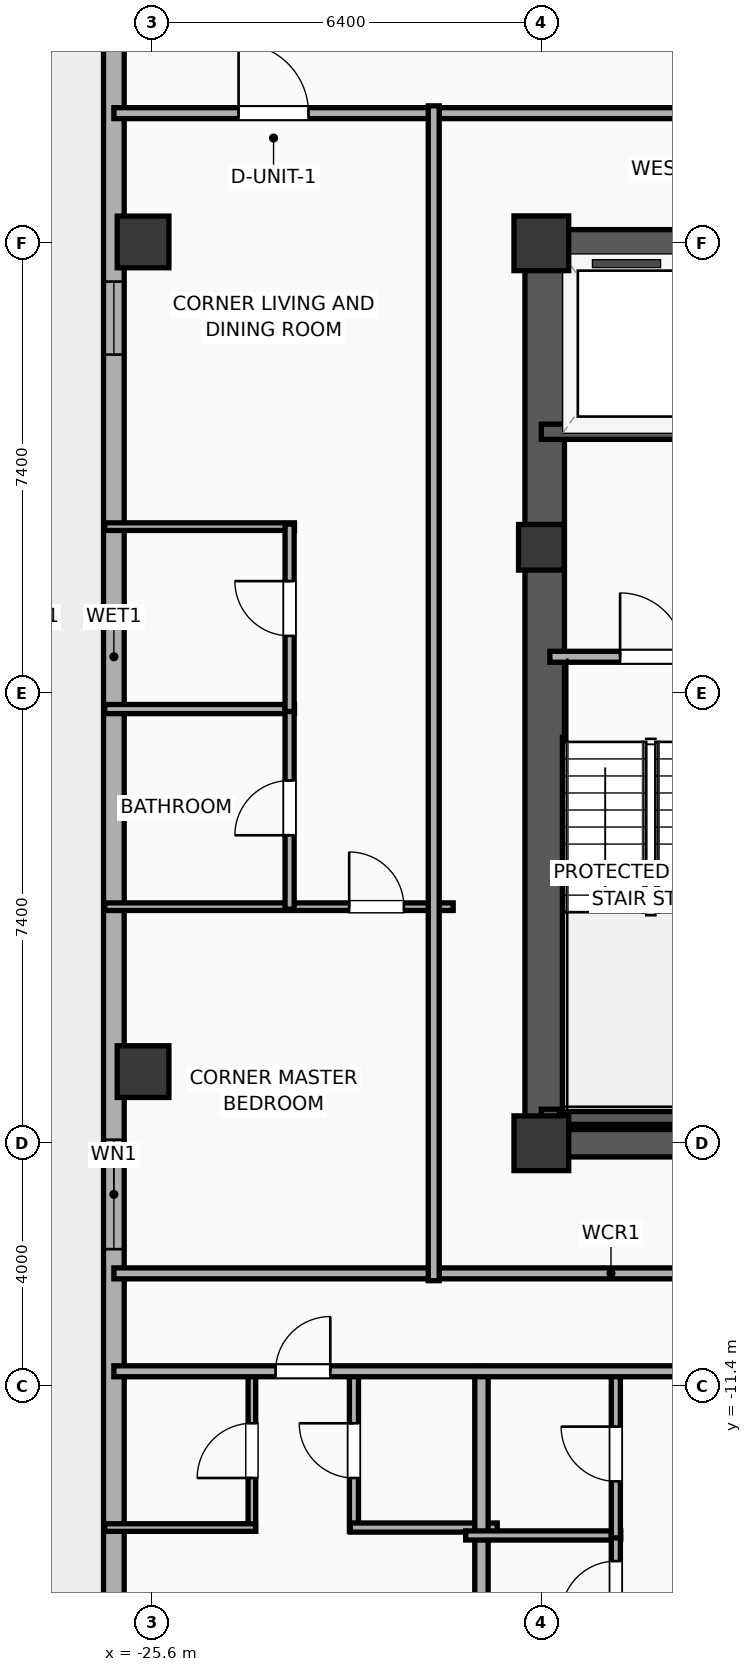
"""IFC4 building model, lengths in metres.
Left out: names, types, materials, properties, quantities, classifications, styles, units other than length and angle.
Written with IfcOpenShell. Run it as: python <this file> out.ifc"""

import sys

from ifc_helpers import new_model, si_unit, direction, frame, frame_2d, origin, origin_2d, place, context, subcontext, project, spatial, rectangle, hollow_rectangle, extrude, element, fill, save


model = new_model("IFC4")
c1 = context("Model", 3, precision=1e-05, world=origin(), true_north=direction((0.0, 1.0)))
c2 = subcontext(c1, "Body", "Model", "MODEL_VIEW")
j1 = project(units=[si_unit("LENGTHUNIT", "METRE"), si_unit("PLANEANGLEUNIT", "RADIAN")], contexts=[c1])
p1 = place(None, origin())
s1 = spatial("IfcSite", under=j1, at=p1, CompositionType="ELEMENT")
p2 = place(p1, origin())
s2 = spatial("IfcBuilding", under=s1, at=p2, CompositionType="ELEMENT")
p3 = place(p2, frame((0.0, 0.0, 231.4)))
s3 = spatial("IfcBuildingStorey", under=s2, at=p3, CompositionType="ELEMENT", Elevation=231.4)
p4 = place(p3, frame((-19.2, -7.4, 0.0), z_axis=(0.0, 0.0, 1.0), x_axis=(1.0, 0.0, 0.0)))
e1 = element("IfcColumn", 1, at=p4, inside=s3, PredefinedType="COLUMN", context=c2, shape_type="SweptSolid", body=[
    extrude(rectangle(XDim=0.9, YDim=0.9, at=origin_2d()), origin(), (0.0, 0.0, 1.0), 3.9),
])
p5 = place(p3, frame((-19.2, 2.4, 0.0), z_axis=(0.0, 0.0, 1.0), x_axis=(1.0, 0.0, 0.0)))
e2 = element("IfcColumn", 2, at=p5, inside=s3, PredefinedType="COLUMN", context=c2, shape_type="SweptSolid", body=[
    extrude(rectangle(XDim=0.75, YDim=0.75, at=origin_2d()), origin(), (0.0, 0.0, 1.0), 3.9),
])
p6 = place(p3, frame((-19.2, 7.4, 0.0), z_axis=(0.0, 0.0, 1.0), x_axis=(1.0, 0.0, 0.0)))
e3 = element("IfcColumn", 3, at=p6, inside=s3, PredefinedType="COLUMN", context=c2, shape_type="SweptSolid", body=[
    extrude(rectangle(XDim=0.9, YDim=0.9, at=origin_2d()), origin(), (0.0, 0.0, 1.0), 3.9),
])
for number, where, z_axis, x_axis in (
    (4, (-19.425, -7.4, 0.0), (0.0, 0.0, 1.0), (1.0, 0.0, 0.0)),
    (5, (-19.425, 7.4, 0.0), (0.0, 0.0, 1.0), (1.0, 0.0, 0.0)),
):
    element("IfcWall", number, at=place(p3, frame(where, z_axis=z_axis, x_axis=x_axis)), inside=s3, PredefinedType="SHEAR", context=c2, shape_type="SweptSolid", body=[
        extrude(rectangle(XDim=7.25, YDim=0.45, at=frame_2d((3.625, 0.0))), origin(), (0.0, 0.0, 1.0), 3.65),
    ])
p7 = place(p3, frame((-19.145, -7.4, 0.0), z_axis=(0.0, 0.0, 1.0), x_axis=(0.0, 1.0, 0.0)))
e6 = element("IfcWall", 6, at=p7, inside=s3, PredefinedType="SHEAR", context=c2, shape_type="SweptSolid", body=[
    extrude(rectangle(XDim=14.8, YDim=0.65, at=frame_2d((7.4, 0.0))), origin(), (0.0, 0.0, 1.0), 3.65),
])
p8 = place(p3, frame((-19.2, -6.965, 0.0), z_axis=(0.0, 0.0, 1.0), x_axis=(1.0, 0.0, 0.0)))
e7 = element("IfcWall", 7, at=p8, inside=s3, PredefinedType="SOLIDWALL", context=c2, shape_type="SweptSolid", body=[
    extrude(rectangle(XDim=3.46, YDim=0.25, at=frame_2d((1.73, 0.0))), origin(), (0.0, 0.0, 1.0), 3.65),
])
for number, where, z_axis, x_axis in (
    (8, (-25.75, 7.422, 0.0), (0.0, 0.0, 1.0), (1.0, 0.0, 0.0)),
    (9, (-25.75, -6.222, 0.0), (0.0, 0.0, 1.0), (1.0, 0.0, 0.0)),
):
    element("IfcColumn", number, at=place(p3, frame(where, z_axis=z_axis, x_axis=x_axis)), inside=s3, PredefinedType="COLUMN", context=c2, shape_type="SweptSolid", body=[
        extrude(hollow_rectangle(XDim=0.85, YDim=0.85, WallThickness=0.028, at=origin_2d()), origin(), (0.0, 0.0, 1.0), 3.9),
    ])
p9 = place(p3, frame((-26.23, -15.383, 0.0), z_axis=(0.0, 0.0, 1.0), x_axis=(0.0, 1.0, 0.0)))
e10 = element("IfcWall", 10, at=p9, inside=s3, PredefinedType="ELEMENTEDWALL", context=c2, shape_type="SweptSolid", body=[
    extrude(rectangle(XDim=31.967, YDim=0.34, at=frame_2d((15.983, 0.0))), origin(), (0.0, 0.0, 1.0), 3.65),
])
p10 = place(p9, frame((6.242, 0.0, 0.75)))
e11 = element("IfcOpeningElement", 11, at=p10, cuts=e10, PredefinedType="OPENING", context=c2, shape_type="SweptSolid", body=[
    extrude(rectangle(XDim=1.8, YDim=2.1, at=frame_2d((0.9, 1.05))), frame((0.0, 0.18, 0.0), z_axis=(0.0, -1.0, 0.0), x_axis=(1.0, 0.0, 0.0)), (0.0, 0.0, 1.0), 0.36),
])
p11 = place(p9, frame((29.667, 0.0, 0.75)))
e12 = element("IfcOpeningElement", 12, at=p11, cuts=e10, PredefinedType="OPENING", context=c2, shape_type="SweptSolid", body=[
    extrude(rectangle(XDim=1.2, YDim=2.05, at=frame_2d((0.6, 1.025))), frame((0.0, 0.18, 0.0), z_axis=(0.0, -1.0, 0.0), x_axis=(1.0, 0.0, 0.0)), (0.0, 0.0, 1.0), 0.36),
])
p12 = place(p9, frame((20.953, 0.0, 0.75)))
e13 = element("IfcOpeningElement", 13, at=p12, cuts=e10, PredefinedType="OPENING", context=c2, shape_type="SweptSolid", body=[
    extrude(rectangle(XDim=1.2, YDim=2.05, at=frame_2d((0.6, 1.025))), frame((0.0, 0.18, 0.0), z_axis=(0.0, -1.0, 0.0), x_axis=(1.0, 0.0, 0.0)), (0.0, 0.0, 1.0), 0.36),
])
p13 = place(p3, frame((-19.2, 4.3, 0.0), z_axis=(0.0, 0.0, 1.0), x_axis=(1.0, 0.0, 0.0)))
e14 = element("IfcWall", 14, at=p13, inside=s3, PredefinedType="SOLIDWALL", context=c2, shape_type="SweptSolid", body=[
    extrude(rectangle(XDim=2.6, YDim=0.25, at=frame_2d((1.3, 0.0))), origin(), (0.0, 0.0, 1.0), 3.65),
])
p14 = place(p3, frame((-19.06, 0.6, 0.0), z_axis=(0.0, 0.0, 1.0), x_axis=(1.0, 0.0, 0.0)))
e15 = element("IfcWall", 15, at=p14, inside=s3, PredefinedType="PARTITIONING", context=c2, shape_type="SweptSolid", body=[
    extrude(rectangle(XDim=3.36, YDim=0.18, at=frame_2d((1.68, 0.0))), origin(), (0.0, 0.0, 1.0), 3.65),
])
p15 = place(p14, frame((1.155, 0.0, 0.0)))
e16 = element("IfcOpeningElement", 16, at=p15, cuts=e15, PredefinedType="OPENING", context=c2, shape_type="SweptSolid", body=[
    extrude(rectangle(XDim=1.05, YDim=2.05, at=frame_2d((0.525, 1.025))), frame((0.0, 0.1, 0.0), z_axis=(0.0, -1.0, 0.0), x_axis=(1.0, 0.0, 0.0)), (0.0, 0.0, 1.0), 0.2),
])
p16 = place(p3, frame((-26.23, 9.54, 0.0), z_axis=(0.0, 0.0, 1.0), x_axis=(1.0, 0.0, 0.0)))
e17 = element("IfcWall", 17, at=p16, inside=s3, PredefinedType="PARTITIONING", context=c2, shape_type="SweptSolid", body=[
    extrude(rectangle(XDim=16.35, YDim=0.18, at=frame_2d((8.175, 0.0))), origin(), (0.0, 0.0, 1.0), 3.65),
])
p17 = place(p16, frame((2.051, 0.0, 0.0)))
e18 = element("IfcOpeningElement", 18, at=p17, cuts=e17, PredefinedType="OPENING", context=c2, shape_type="SweptSolid", body=[
    extrude(rectangle(XDim=1.15, YDim=2.05, at=frame_2d((0.575, 1.025))), frame((0.0, 0.1, 0.0), z_axis=(0.0, -1.0, 0.0), x_axis=(1.0, 0.0, 0.0)), (0.0, 0.0, 1.0), 0.2),
])
p18 = place(p3, frame((-26.23, -9.54, 0.0), z_axis=(0.0, 0.0, 1.0), x_axis=(1.0, 0.0, 0.0)))
e19 = element("IfcWall", 19, at=p18, inside=s3, PredefinedType="PARTITIONING", context=c2, shape_type="SweptSolid", body=[
    extrude(rectangle(XDim=16.35, YDim=0.18, at=frame_2d((8.175, 0.0))), origin(), (0.0, 0.0, 1.0), 3.65),
])
p19 = place(p3, frame((-23.96, -13.78, 0.0), z_axis=(0.0, 0.0, 1.0), x_axis=(0.0, 1.0, 0.0)))
e20 = element("IfcWall", 20, at=p19, inside=s3, PredefinedType="PARTITIONING", context=c2, shape_type="SweptSolid", body=[
    extrude(rectangle(XDim=2.65, YDim=0.125, at=frame_2d((1.325, 0.0))), origin(), (0.0, 0.0, 1.0), 3.65),
])
p20 = place(p19, frame((0.875, 0.0, 0.0)))
e21 = element("IfcOpeningElement", 21, at=p20, cuts=e20, PredefinedType="OPENING", context=c2, shape_type="SweptSolid", body=[
    extrude(rectangle(XDim=0.9, YDim=2.05, at=frame_2d((0.45, 1.025))), frame((0.0, 0.073, 0.0), z_axis=(0.0, -1.0, 0.0), x_axis=(1.0, 0.0, 0.0)), (0.0, 0.0, 1.0), 0.145),
])
p21 = place(p3, frame((-22.282, -13.78, 0.0), z_axis=(0.0, 0.0, 1.0), x_axis=(0.0, 1.0, 0.0)))
e22 = element("IfcWall", 22, at=p21, inside=s3, PredefinedType="PLUMBINGWALL", context=c2, shape_type="SweptSolid", body=[
    extrude(rectangle(XDim=2.65, YDim=0.15, at=frame_2d((1.325, 0.0))), origin(), (0.0, 0.0, 1.0), 3.65),
])
p22 = place(p21, frame((0.875, 0.0, 0.0)))
e23 = element("IfcOpeningElement", 23, at=p22, cuts=e22, PredefinedType="OPENING", context=c2, shape_type="SweptSolid", body=[
    extrude(rectangle(XDim=0.9, YDim=2.05, at=frame_2d((0.45, 1.025))), frame((0.0, 0.085, 0.0), z_axis=(0.0, -1.0, 0.0), x_axis=(1.0, 0.0, 0.0)), (0.0, 0.0, 1.0), 0.17),
])
p23 = place(p3, frame((-26.38, -13.72, 0.0), z_axis=(0.0, 0.0, 1.0), x_axis=(1.0, 0.0, 0.0)))
e24 = element("IfcWall", 24, at=p23, inside=s3, PredefinedType="PARTITIONING", context=c2, shape_type="SweptSolid", body=[
    extrude(rectangle(XDim=2.48, YDim=0.125, at=frame_2d((1.24, 0.0))), origin(), (0.0, 0.0, 1.0), 3.65),
])
p24 = place(p3, frame((-22.342, -13.72, 0.0), z_axis=(0.0, 0.0, 1.0), x_axis=(1.0, 0.0, 0.0)))
e25 = element("IfcWall", 25, at=p24, inside=s3, PredefinedType="PLUMBINGWALL", context=c2, shape_type="SweptSolid", body=[
    extrude(rectangle(XDim=2.417, YDim=0.15, at=frame_2d((1.208, 0.0))), origin(), (0.0, 0.0, 1.0), 3.65),
])
p25 = place(p3, frame((-20.185, -18.83, 0.0), z_axis=(0.0, 0.0, 1.0), x_axis=(0.0, 1.0, 0.0)))
e26 = element("IfcWall", 26, at=p25, inside=s3, PredefinedType="PARTITIONING", context=c2, shape_type="SweptSolid", body=[
    extrude(rectangle(XDim=7.76, YDim=0.22, at=frame_2d((3.88, 0.0))), origin(), (0.0, 0.0, 1.0), 3.65),
])
p26 = place(p3, frame((-20.445, -13.85, 0.0), z_axis=(0.0, 0.0, 1.0), x_axis=(1.0, 0.0, 0.0)))
e27 = element("IfcWall", 27, at=p26, inside=s3, PredefinedType="PLUMBINGWALL", context=c2, shape_type="SweptSolid", body=[
    extrude(rectangle(XDim=2.55, YDim=0.15, at=frame_2d((1.275, 0.0))), origin(), (0.0, 0.0, 1.0), 3.65),
])
p27 = place(p3, frame((-17.975, -18.877, 0.0), z_axis=(0.0, 0.0, 1.0), x_axis=(0.0, 1.0, 0.0)))
e28 = element("IfcWall", 28, at=p27, inside=s3, PredefinedType="PLUMBINGWALL", context=c2, shape_type="SweptSolid", body=[
    extrude(rectangle(XDim=5.067, YDim=0.15, at=frame_2d((2.533, 0.0))), origin(), (0.0, 0.0, 1.0), 3.65),
])
p28 = place(p27, frame((3.705, 0.0, 0.0)))
e29 = element("IfcOpeningElement", 29, at=p28, cuts=e28, PredefinedType="OPENING", context=c2, shape_type="SweptSolid", body=[
    extrude(rectangle(XDim=0.9, YDim=2.05, at=frame_2d((0.45, 1.025))), frame((0.0, 0.085, 0.0), z_axis=(0.0, -1.0, 0.0), x_axis=(1.0, 0.0, 0.0)), (0.0, 0.0, 1.0), 0.17),
])
p29 = place(p3, frame((-17.975, -13.89, 0.0), z_axis=(0.0, 0.0, 1.0), x_axis=(0.0, 1.0, 0.0)))
e30 = element("IfcWall", 30, at=p29, inside=s3, PredefinedType="PLUMBINGWALL", context=c2, shape_type="SweptSolid", body=[
    extrude(rectangle(XDim=2.76, YDim=0.15, at=frame_2d((1.38, 0.0))), origin(), (0.0, 0.0, 1.0), 3.65),
])
p30 = place(p29, frame((0.93, 0.0, 0.0)))
e31 = element("IfcOpeningElement", 31, at=p30, cuts=e30, PredefinedType="OPENING", context=c2, shape_type="SweptSolid", body=[
    extrude(rectangle(XDim=0.9, YDim=2.05, at=frame_2d((0.45, 1.025))), frame((0.0, 0.085, 0.0), z_axis=(0.0, -1.0, 0.0), x_axis=(1.0, 0.0, 0.0)), (0.0, 0.0, 1.0), 0.17),
])
p31 = place(p3, frame((-26.23, -11.15, 0.0), z_axis=(0.0, 0.0, 1.0), x_axis=(1.0, 0.0, 0.0)))
e32 = element("IfcWall", 32, at=p31, inside=s3, PredefinedType="PARTITIONING", context=c2, shape_type="SweptSolid", body=[
    extrude(rectangle(XDim=18.15, YDim=0.18, at=frame_2d((9.075, 0.0))), origin(), (0.0, 0.0, 1.0), 3.65),
])
p32 = place(p31, frame((2.659, 0.0, 0.0)))
e33 = element("IfcOpeningElement", 33, at=p32, cuts=e32, PredefinedType="OPENING", context=c2, shape_type="SweptSolid", body=[
    extrude(rectangle(XDim=0.9, YDim=2.05, at=frame_2d((0.45, 1.025))), frame((0.0, 0.1, 0.0), z_axis=(0.0, -1.0, 0.0), x_axis=(1.0, 0.0, 0.0)), (0.0, 0.0, 1.0), 0.2),
])
p33 = place(p31, frame((9.571, 0.0, 0.0)))
e34 = element("IfcOpeningElement", 34, at=p33, cuts=e32, PredefinedType="OPENING", context=c2, shape_type="SweptSolid", body=[
    extrude(rectangle(XDim=1.15, YDim=2.05, at=frame_2d((0.575, 1.025))), frame((0.0, 0.1, 0.0), z_axis=(0.0, -1.0, 0.0), x_axis=(1.0, 0.0, 0.0)), (0.0, 0.0, 1.0), 0.2),
])
p34 = place(p31, frame((14.792, 0.0, 0.0)))
e35 = element("IfcOpeningElement", 35, at=p34, cuts=e32, PredefinedType="OPENING", context=c2, shape_type="SweptSolid", body=[
    extrude(rectangle(XDim=0.9, YDim=2.05, at=frame_2d((0.45, 1.025))), frame((0.0, 0.1, 0.0), z_axis=(0.0, -1.0, 0.0), x_axis=(1.0, 0.0, 0.0)), (0.0, 0.0, 1.0), 0.2),
])
p35 = place(p3, frame((-26.38, 2.74, 0.0), z_axis=(0.0, 0.0, 1.0), x_axis=(1.0, 0.0, 0.0)))
e36 = element("IfcWall", 36, at=p35, inside=s3, PredefinedType="PARTITIONING", context=c2, shape_type="SweptSolid", body=[
    extrude(rectangle(XDim=3.12, YDim=0.125, at=frame_2d((1.56, 0.0))), origin(), (0.0, 0.0, 1.0), 3.65),
])
p36 = place(p3, frame((-26.38, -0.26, 0.0), z_axis=(0.0, 0.0, 1.0), x_axis=(1.0, 0.0, 0.0)))
e37 = element("IfcWall", 37, at=p36, inside=s3, PredefinedType="PLUMBINGWALL", context=c2, shape_type="SweptSolid", body=[
    extrude(rectangle(XDim=3.12, YDim=0.15, at=frame_2d((1.56, 0.0))), origin(), (0.0, 0.0, 1.0), 3.65),
])
p37 = place(p3, frame((-26.38, -3.51, 0.0), z_axis=(0.0, 0.0, 1.0), x_axis=(1.0, 0.0, 0.0)))
e38 = element("IfcWall", 38, at=p37, inside=s3, PredefinedType="PARTITIONING", context=c2, shape_type="SweptSolid", body=[
    extrude(rectangle(XDim=5.73, YDim=0.125, at=frame_2d((2.865, 0.0))), origin(), (0.0, 0.0, 1.0), 3.65),
])
p38 = place(p37, frame((4.019, 0.0, 0.0)))
e39 = element("IfcOpeningElement", 39, at=p38, cuts=e38, PredefinedType="OPENING", context=c2, shape_type="SweptSolid", body=[
    extrude(rectangle(XDim=0.9, YDim=2.05, at=frame_2d((0.45, 1.025))), frame((0.0, 0.073, 0.0), z_axis=(0.0, -1.0, 0.0), x_axis=(1.0, 0.0, 0.0)), (0.0, 0.0, 1.0), 0.145),
])
p39 = place(p3, frame((-23.34, -3.55, 0.0), z_axis=(0.0, 0.0, 1.0), x_axis=(0.0, 1.0, 0.0)))
e40 = element("IfcWall", 40, at=p39, inside=s3, PredefinedType="PLUMBINGWALL", context=c2, shape_type="SweptSolid", body=[
    extrude(rectangle(XDim=3.33, YDim=0.15, at=frame_2d((1.665, 0.0))), origin(), (0.0, 0.0, 1.0), 3.65),
])
p40 = place(p39, frame((1.215, 0.0, 0.0)))
e41 = element("IfcOpeningElement", 41, at=p40, cuts=e40, PredefinedType="OPENING", context=c2, shape_type="SweptSolid", body=[
    extrude(rectangle(XDim=0.9, YDim=2.05, at=frame_2d((0.45, 1.025))), frame((0.0, 0.085, 0.0), z_axis=(0.0, -1.0, 0.0), x_axis=(1.0, 0.0, 0.0)), (0.0, 0.0, 1.0), 0.17),
])
p41 = place(p3, frame((-23.34, -0.3, 0.0), z_axis=(0.0, 0.0, 1.0), x_axis=(0.0, 1.0, 0.0)))
e42 = element("IfcWall", 42, at=p41, inside=s3, PredefinedType="PLUMBINGWALL", context=c2, shape_type="SweptSolid", body=[
    extrude(rectangle(XDim=3.08, YDim=0.15, at=frame_2d((1.54, 0.0))), origin(), (0.0, 0.0, 1.0), 3.65),
])
p42 = place(p41, frame((1.244, 0.0, 0.0)))
e43 = element("IfcOpeningElement", 43, at=p42, cuts=e42, PredefinedType="OPENING", context=c2, shape_type="SweptSolid", body=[
    extrude(rectangle(XDim=0.9, YDim=2.05, at=frame_2d((0.45, 1.025))), frame((0.0, 0.085, 0.0), z_axis=(0.0, -1.0, 0.0), x_axis=(1.0, 0.0, 0.0)), (0.0, 0.0, 1.0), 0.17),
])
p43 = place(p3, frame((-20.97, -9.66, 0.0), z_axis=(0.0, 0.0, 1.0), x_axis=(0.0, 1.0, 0.0)))
e44 = element("IfcWall", 44, at=p43, inside=s3, PredefinedType="PARTITIONING", context=c2, shape_type="SweptSolid", body=[
    extrude(rectangle(XDim=19.32, YDim=0.18, at=frame_2d((9.66, 0.0))), origin(), (0.0, 0.0, 1.0), 3.65),
])
p44 = place(p10, origin())
e45 = element("IfcWindow", 45, at=p44, inside=s3, PartitioningType="SINGLE_PANEL", PredefinedType="WINDOW", context=c2, shape_type="SweptSolid", body=[
    extrude(rectangle(XDim=1.8, YDim=2.1, at=frame_2d((0.9, 1.05))), frame((0.0, 0.03, 0.0), z_axis=(0.0, -1.0, 0.0), x_axis=(1.0, 0.0, 0.0)), (0.0, 0.0, 1.0), 0.06),
])
fill(e11, e45)
p45 = place(p12, origin())
e46 = element("IfcWindow", 46, at=p45, inside=s3, PartitioningType="SINGLE_PANEL", PredefinedType="WINDOW", context=c2, shape_type="SweptSolid", body=[
    extrude(rectangle(XDim=1.2, YDim=2.05, at=frame_2d((0.6, 1.025))), frame((0.0, 0.03, 0.0), z_axis=(0.0, -1.0, 0.0), x_axis=(1.0, 0.0, 0.0)), (0.0, 0.0, 1.0), 0.06),
])
fill(e13, e46)
p46 = place(p15, origin())
e47 = element("IfcDoor", 47, at=p46, inside=s3, OperationType="SINGLE_SWING_LEFT", PredefinedType="DOOR", context=c2, shape_type="SweptSolid", body=[
    extrude(rectangle(XDim=1.05, YDim=2.05, at=frame_2d((0.525, 1.025))), frame((0.0, 0.025, 0.0), z_axis=(0.0, -1.0, 0.0), x_axis=(1.0, 0.0, 0.0)), (0.0, 0.0, 1.0), 0.05),
])
fill(e16, e47)
p47 = place(p17, origin())
e48 = element("IfcDoor", 48, at=p47, inside=s3, OperationType="SINGLE_SWING_LEFT", PredefinedType="DOOR", context=c2, shape_type="SweptSolid", body=[
    extrude(rectangle(XDim=1.15, YDim=2.05, at=frame_2d((0.575, 1.025))), frame((0.0, 0.025, 0.0), z_axis=(0.0, -1.0, 0.0), x_axis=(1.0, 0.0, 0.0)), (0.0, 0.0, 1.0), 0.05),
])
fill(e18, e48)
p48 = place(p20, origin())
e49 = element("IfcDoor", 49, at=p48, inside=s3, OperationType="SINGLE_SWING_LEFT", PredefinedType="DOOR", context=c2, shape_type="SweptSolid", body=[
    extrude(rectangle(XDim=0.9, YDim=2.05, at=frame_2d((0.45, 1.025))), frame((0.0, 0.025, 0.0), z_axis=(0.0, -1.0, 0.0), x_axis=(1.0, 0.0, 0.0)), (0.0, 0.0, 1.0), 0.05),
])
fill(e21, e49)
p49 = place(p22, origin())
e50 = element("IfcDoor", 50, at=p49, inside=s3, OperationType="SINGLE_SWING_RIGHT", PredefinedType="DOOR", context=c2, shape_type="SweptSolid", body=[
    extrude(rectangle(XDim=0.9, YDim=2.05, at=frame_2d((0.45, 1.025))), frame((0.0, 0.025, 0.0), z_axis=(0.0, -1.0, 0.0), x_axis=(1.0, 0.0, 0.0)), (0.0, 0.0, 1.0), 0.05),
])
fill(e23, e50)
p50 = place(p28, origin())
e51 = element("IfcDoor", 51, at=p50, inside=s3, OperationType="SINGLE_SWING_LEFT", PredefinedType="DOOR", context=c2, shape_type="SweptSolid", body=[
    extrude(rectangle(XDim=0.9, YDim=2.05, at=frame_2d((0.45, 1.025))), frame((0.0, 0.025, 0.0), z_axis=(0.0, -1.0, 0.0), x_axis=(1.0, 0.0, 0.0)), (0.0, 0.0, 1.0), 0.05),
])
fill(e29, e51)
p51 = place(p30, origin())
e52 = element("IfcDoor", 52, at=p51, inside=s3, OperationType="SINGLE_SWING_RIGHT", PredefinedType="DOOR", context=c2, shape_type="SweptSolid", body=[
    extrude(rectangle(XDim=0.9, YDim=2.05, at=frame_2d((0.45, 1.025))), frame((0.0, 0.025, 0.0), z_axis=(0.0, -1.0, 0.0), x_axis=(1.0, 0.0, 0.0)), (0.0, 0.0, 1.0), 0.05),
])
fill(e31, e52)
p52 = place(p32, origin())
e53 = element("IfcDoor", 53, at=p52, inside=s3, OperationType="SINGLE_SWING_RIGHT", PredefinedType="DOOR", context=c2, shape_type="SweptSolid", body=[
    extrude(rectangle(XDim=0.9, YDim=2.05, at=frame_2d((0.45, 1.025))), frame((0.0, 0.025, 0.0), z_axis=(0.0, -1.0, 0.0), x_axis=(1.0, 0.0, 0.0)), (0.0, 0.0, 1.0), 0.05),
])
fill(e33, e53)
p53 = place(p38, origin())
e54 = element("IfcDoor", 54, at=p53, inside=s3, OperationType="SINGLE_SWING_LEFT", PredefinedType="DOOR", context=c2, shape_type="SweptSolid", body=[
    extrude(rectangle(XDim=0.9, YDim=2.05, at=frame_2d((0.45, 1.025))), frame((0.0, 0.025, 0.0), z_axis=(0.0, -1.0, 0.0), x_axis=(1.0, 0.0, 0.0)), (0.0, 0.0, 1.0), 0.05),
])
fill(e39, e54)
p54 = place(p40, origin())
e55 = element("IfcDoor", 55, at=p54, inside=s3, OperationType="SINGLE_SWING_LEFT", PredefinedType="DOOR", context=c2, shape_type="SweptSolid", body=[
    extrude(rectangle(XDim=0.9, YDim=2.05, at=frame_2d((0.45, 1.025))), frame((0.0, 0.025, 0.0), z_axis=(0.0, -1.0, 0.0), x_axis=(1.0, 0.0, 0.0)), (0.0, 0.0, 1.0), 0.05),
])
fill(e41, e55)
p55 = place(p42, origin())
e56 = element("IfcDoor", 56, at=p55, inside=s3, OperationType="SINGLE_SWING_RIGHT", PredefinedType="DOOR", context=c2, shape_type="SweptSolid", body=[
    extrude(rectangle(XDim=0.9, YDim=2.05, at=frame_2d((0.45, 1.025))), frame((0.0, 0.025, 0.0), z_axis=(0.0, -1.0, 0.0), x_axis=(1.0, 0.0, 0.0)), (0.0, 0.0, 1.0), 0.05),
])
fill(e43, e56)
save(model, sys.argv[1])
